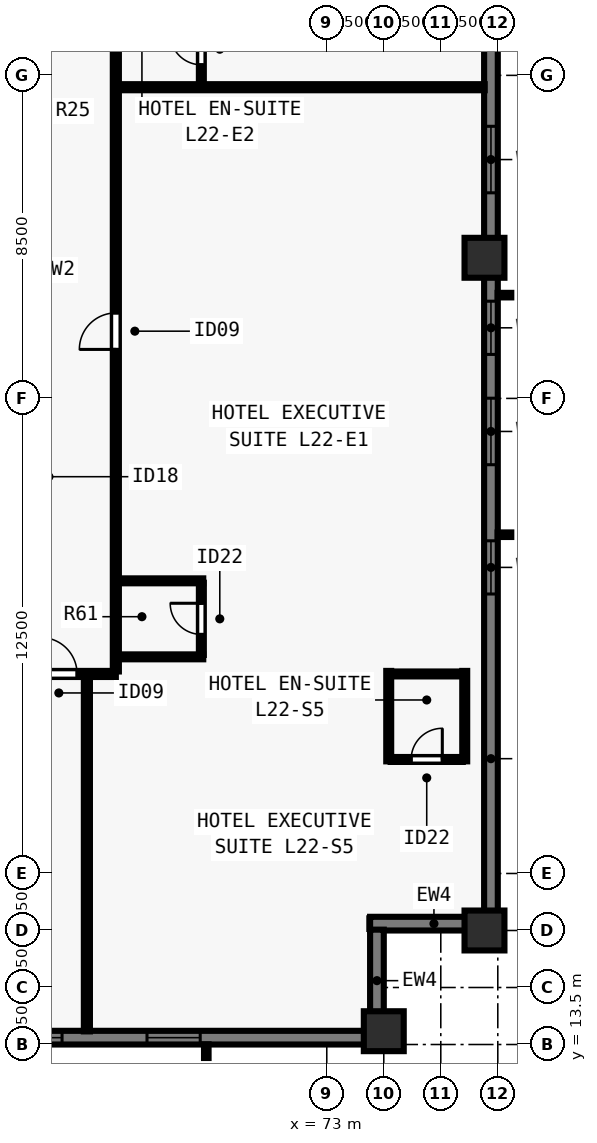
"""IFC4 building model, lengths in metres.
Left out: names, types, materials, properties, quantities, classifications, styles, units other than length and angle.
Written with IfcOpenShell. Run it as: python <this file> out.ifc"""

import sys

from ifc_helpers import new_model, si_unit, direction, frame, frame_2d, origin, origin_2d, place, context, subcontext, project, spatial, rectangle, extrude, element, fill, save


model = new_model("IFC4")
c1 = context("Model", 3, precision=1e-05, world=origin(), true_north=direction((0.0, 1.0)))
c2 = subcontext(c1, "Body", "Model", "MODEL_VIEW")
j1 = project(units=[si_unit("LENGTHUNIT", "METRE"), si_unit("PLANEANGLEUNIT", "RADIAN")], contexts=[c1])
p1 = place(None, origin())
s1 = spatial("IfcSite", under=j1, at=p1, CompositionType="ELEMENT")
p2 = place(p1, origin())
s2 = spatial("IfcBuilding", under=s1, at=p2, CompositionType="ELEMENT")
p3 = place(p2, frame((0.0, 0.0, 83.0)))
s3 = spatial("IfcBuildingStorey", under=s2, at=p3, CompositionType="ELEMENT", Elevation=83.0)
for number, where, z_axis, x_axis in (
    (1, (74.5, 13.85, 0.0), (0.0, 0.0, 1.0), (1.0, 0.0, 0.0)),
    (2, (77.15, 16.5, 0.0), (0.0, 0.0, 1.0), (0.0, 1.0, 0.0)),
    (3, (77.15, 34.2, 0.0), (0.0, 0.0, 1.0), (0.0, 1.0, 0.0)),
):
    element("IfcColumn", number, at=place(p3, frame(where, z_axis=z_axis, x_axis=x_axis)), inside=s3, PredefinedType="COLUMN", context=c2, shape_type="SweptSolid", body=[
        extrude(rectangle(XDim=1.05, YDim=1.05, at=origin_2d()), origin(), (0.0, 0.0, 1.0), 3.5),
    ])
p4 = place(p3, frame((77.32, 46.0, 0.0), z_axis=(0.0, 0.0, 1.0), x_axis=(0.0, -1.0, 0.0)))
e4 = element("IfcWall", 4, at=p4, inside=s3, PredefinedType="SOLIDWALL", context=c2, shape_type="SweptSolid", body=[
    extrude(rectangle(XDim=29.162, YDim=0.36, at=frame_2d((14.581, 0.0))), origin(), (0.0, 0.0, 1.0), 3.28),
])
p5 = place(p4, frame((4.938, 0.0, 0.8)))
e5 = element("IfcOpeningElement", 5, at=p5, cuts=e4, PredefinedType="OPENING", context=c2, shape_type="SweptSolid", body=[
    extrude(rectangle(XDim=1.4, YDim=1.544, at=frame_2d((0.7, 0.772))), frame((0.0, 0.19, 0.0), z_axis=(0.0, -1.0, 0.0), x_axis=(1.0, 0.0, 0.0)), (0.0, 0.0, 1.0), 0.38),
])
p6 = place(p4, frame((8.341, 0.0, 0.8)))
e6 = element("IfcOpeningElement", 6, at=p6, cuts=e4, PredefinedType="OPENING", context=c2, shape_type="SweptSolid", body=[
    extrude(rectangle(XDim=1.75, YDim=1.544, at=frame_2d((0.875, 0.772))), frame((0.0, 0.19, 0.0), z_axis=(0.0, -1.0, 0.0), x_axis=(1.0, 0.0, 0.0)), (0.0, 0.0, 1.0), 0.38),
])
p7 = place(p4, frame((12.942, 0.0, 0.8)))
e7 = element("IfcOpeningElement", 7, at=p7, cuts=e4, PredefinedType="OPENING", context=c2, shape_type="SweptSolid", body=[
    extrude(rectangle(XDim=1.4, YDim=1.544, at=frame_2d((0.7, 0.772))), frame((0.0, 0.19, 0.0), z_axis=(0.0, -1.0, 0.0), x_axis=(1.0, 0.0, 0.0)), (0.0, 0.0, 1.0), 0.38),
])
p8 = place(p4, frame((15.494, 0.0, 0.8)))
e8 = element("IfcOpeningElement", 8, at=p8, cuts=e4, PredefinedType="OPENING", context=c2, shape_type="SweptSolid", body=[
    extrude(rectangle(XDim=1.75, YDim=1.544, at=frame_2d((0.875, 0.772))), frame((0.0, 0.19, 0.0), z_axis=(0.0, -1.0, 0.0), x_axis=(1.0, 0.0, 0.0)), (0.0, 0.0, 1.0), 0.38),
])
p9 = place(p4, frame((19.247, 0.0, 0.8)))
e9 = element("IfcOpeningElement", 9, at=p9, cuts=e4, PredefinedType="OPENING", context=c2, shape_type="SweptSolid", body=[
    extrude(rectangle(XDim=1.4, YDim=1.544, at=frame_2d((0.7, 0.772))), frame((0.0, 0.19, 0.0), z_axis=(0.0, -1.0, 0.0), x_axis=(1.0, 0.0, 0.0)), (0.0, 0.0, 1.0), 0.38),
])
p10 = place(p3, frame((77.5, 16.68, 0.0), z_axis=(0.0, 0.0, 1.0), x_axis=(-1.0, 0.0, 0.0)))
e10 = element("IfcWall", 10, at=p10, inside=s3, PredefinedType="SOLIDWALL", context=c2, shape_type="SweptSolid", body=[
    extrude(rectangle(XDim=3.36, YDim=0.36, at=frame_2d((1.68, 0.0))), origin(), (0.0, 0.0, 1.0), 3.28),
])
p11 = place(p3, frame((74.32, 16.522, 0.0), z_axis=(0.0, 0.0, 1.0), x_axis=(0.0, -1.0, 0.0)))
e11 = element("IfcWall", 11, at=p11, inside=s3, PredefinedType="SOLIDWALL", context=c2, shape_type="SweptSolid", body=[
    extrude(rectangle(XDim=2.684, YDim=0.36, at=frame_2d((1.342, 0.0))), origin(), (0.0, 0.0, 1.0), 3.28),
])
p12 = place(p3, frame((74.5, 13.68, 0.0), z_axis=(0.0, 0.0, 1.0), x_axis=(-1.0, 0.0, 0.0)))
e12 = element("IfcWall", 12, at=p12, inside=s3, PredefinedType="SOLIDWALL", context=c2, shape_type="SweptSolid", body=[
    extrude(rectangle(XDim=44.662, YDim=0.36, at=frame_2d((22.331, 0.0))), origin(), (0.0, 0.0, 1.0), 3.28),
])
p13 = place(p12, frame((4.83, 0.0, 0.8)))
e13 = element("IfcOpeningElement", 13, at=p13, cuts=e12, PredefinedType="OPENING", context=c2, shape_type="SweptSolid", body=[
    extrude(rectangle(XDim=1.4, YDim=1.544, at=frame_2d((0.7, 0.772))), frame((0.0, 0.19, 0.0), z_axis=(0.0, -1.0, 0.0), x_axis=(1.0, 0.0, 0.0)), (0.0, 0.0, 1.0), 0.38),
])
p14 = place(p12, frame((8.465, 0.0, 0.8)))
e14 = element("IfcOpeningElement", 14, at=p14, cuts=e12, PredefinedType="OPENING", context=c2, shape_type="SweptSolid", body=[
    extrude(rectangle(XDim=1.75, YDim=1.544, at=frame_2d((0.875, 0.772))), frame((0.0, 0.19, 0.0), z_axis=(0.0, -1.0, 0.0), x_axis=(1.0, 0.0, 0.0)), (0.0, 0.0, 1.0), 0.38),
])
p15 = place(p12, frame((11.551, 0.0, 0.8)))
e15 = element("IfcOpeningElement", 15, at=p15, cuts=e12, PredefinedType="OPENING", context=c2, shape_type="SweptSolid", body=[
    extrude(rectangle(XDim=1.4, YDim=1.544, at=frame_2d((0.7, 0.772))), frame((0.0, 0.19, 0.0), z_axis=(0.0, -1.0, 0.0), x_axis=(1.0, 0.0, 0.0)), (0.0, 0.0, 1.0), 0.38),
])
p16 = place(p12, frame((14.736, 0.0, 0.8)))
e16 = element("IfcOpeningElement", 16, at=p16, cuts=e12, PredefinedType="OPENING", context=c2, shape_type="SweptSolid", body=[
    extrude(rectangle(XDim=1.75, YDim=1.544, at=frame_2d((0.875, 0.772))), frame((0.0, 0.19, 0.0), z_axis=(0.0, -1.0, 0.0), x_axis=(1.0, 0.0, 0.0)), (0.0, 0.0, 1.0), 0.38),
])
p17 = place(p12, frame((18.721, 0.0, 0.8)))
e17 = element("IfcOpeningElement", 17, at=p17, cuts=e12, PredefinedType="OPENING", context=c2, shape_type="SweptSolid", body=[
    extrude(rectangle(XDim=1.4, YDim=1.544, at=frame_2d((0.7, 0.772))), frame((0.0, 0.19, 0.0), z_axis=(0.0, -1.0, 0.0), x_axis=(1.0, 0.0, 0.0)), (0.0, 0.0, 1.0), 0.38),
])
p18 = place(p12, frame((21.456, 0.0, 0.8)))
e18 = element("IfcOpeningElement", 18, at=p18, cuts=e12, PredefinedType="OPENING", context=c2, shape_type="SweptSolid", body=[
    extrude(rectangle(XDim=1.75, YDim=1.544, at=frame_2d((0.875, 0.772))), frame((0.0, 0.19, 0.0), z_axis=(0.0, -1.0, 0.0), x_axis=(1.0, 0.0, 0.0)), (0.0, 0.0, 1.0), 0.38),
])
p19 = place(p12, frame((24.991, 0.0, 0.8)))
e19 = element("IfcOpeningElement", 19, at=p19, cuts=e12, PredefinedType="OPENING", context=c2, shape_type="SweptSolid", body=[
    extrude(rectangle(XDim=1.4, YDim=1.544, at=frame_2d((0.7, 0.772))), frame((0.0, 0.19, 0.0), z_axis=(0.0, -1.0, 0.0), x_axis=(1.0, 0.0, 0.0)), (0.0, 0.0, 1.0), 0.38),
])
p20 = place(p12, frame((28.177, 0.0, 0.8)))
e20 = element("IfcOpeningElement", 20, at=p20, cuts=e12, PredefinedType="OPENING", context=c2, shape_type="SweptSolid", body=[
    extrude(rectangle(XDim=1.75, YDim=1.544, at=frame_2d((0.875, 0.772))), frame((0.0, 0.19, 0.0), z_axis=(0.0, -1.0, 0.0), x_axis=(1.0, 0.0, 0.0)), (0.0, 0.0, 1.0), 0.38),
])
p21 = place(p12, frame((31.711, 0.0, 0.8)))
e21 = element("IfcOpeningElement", 21, at=p21, cuts=e12, PredefinedType="OPENING", context=c2, shape_type="SweptSolid", body=[
    extrude(rectangle(XDim=1.4, YDim=1.544, at=frame_2d((0.7, 0.772))), frame((0.0, 0.19, 0.0), z_axis=(0.0, -1.0, 0.0), x_axis=(1.0, 0.0, 0.0)), (0.0, 0.0, 1.0), 0.38),
])
p22 = place(p12, frame((34.897, 0.0, 0.8)))
e22 = element("IfcOpeningElement", 22, at=p22, cuts=e12, PredefinedType="OPENING", context=c2, shape_type="SweptSolid", body=[
    extrude(rectangle(XDim=1.75, YDim=1.544, at=frame_2d((0.875, 0.772))), frame((0.0, 0.19, 0.0), z_axis=(0.0, -1.0, 0.0), x_axis=(1.0, 0.0, 0.0)), (0.0, 0.0, 1.0), 0.38),
])
p23 = place(p12, frame((38.432, 0.0, 0.8)))
e23 = element("IfcOpeningElement", 23, at=p23, cuts=e12, PredefinedType="OPENING", context=c2, shape_type="SweptSolid", body=[
    extrude(rectangle(XDim=1.4, YDim=1.544, at=frame_2d((0.7, 0.772))), frame((0.0, 0.19, 0.0), z_axis=(0.0, -1.0, 0.0), x_axis=(1.0, 0.0, 0.0)), (0.0, 0.0, 1.0), 0.38),
])
p24 = place(p3, frame((36.55, 23.25, 0.0), z_axis=(0.0, 0.0, 1.0), x_axis=(1.0, 0.0, 0.0)))
e24 = element("IfcWall", 24, at=p24, inside=s3, PredefinedType="PARTITIONING", context=c2, shape_type="SweptSolid", body=[
    extrude(rectangle(XDim=30.9, YDim=0.16, at=frame_2d((15.45, 0.0))), origin(), (0.0, 0.0, 1.0), 3.28),
])
p25 = place(p24, frame((1.13, 0.0, 0.0)))
e25 = element("IfcOpeningElement", 25, at=p25, cuts=e24, PredefinedType="OPENING", context=c2, shape_type="SweptSolid", body=[
    extrude(rectangle(XDim=0.96, YDim=2.15, at=frame_2d((0.48, 1.075))), frame((0.0, 0.09, 0.0), z_axis=(0.0, -1.0, 0.0), x_axis=(1.0, 0.0, 0.0)), (0.0, 0.0, 1.0), 0.18),
])
p26 = place(p24, frame((6.093, 0.0, 0.0)))
e26 = element("IfcOpeningElement", 26, at=p26, cuts=e24, PredefinedType="OPENING", context=c2, shape_type="SweptSolid", body=[
    extrude(rectangle(XDim=0.96, YDim=2.15, at=frame_2d((0.48, 1.075))), frame((0.0, 0.09, 0.0), z_axis=(0.0, -1.0, 0.0), x_axis=(1.0, 0.0, 0.0)), (0.0, 0.0, 1.0), 0.18),
])
p27 = place(p24, frame((16.125, 0.0, 0.0)))
e27 = element("IfcOpeningElement", 27, at=p27, cuts=e24, PredefinedType="OPENING", context=c2, shape_type="SweptSolid", body=[
    extrude(rectangle(XDim=0.96, YDim=2.15, at=frame_2d((0.48, 1.075))), frame((0.0, 0.09, 0.0), z_axis=(0.0, -1.0, 0.0), x_axis=(1.0, 0.0, 0.0)), (0.0, 0.0, 1.0), 0.18),
])
p28 = place(p24, frame((26.157, 0.0, 0.0)))
e28 = element("IfcOpeningElement", 28, at=p28, cuts=e24, PredefinedType="OPENING", context=c2, shape_type="SweptSolid", body=[
    extrude(rectangle(XDim=0.96, YDim=2.15, at=frame_2d((0.48, 1.075))), frame((0.0, 0.09, 0.0), z_axis=(0.0, -1.0, 0.0), x_axis=(1.0, 0.0, 0.0)), (0.0, 0.0, 1.0), 0.18),
])
p29 = place(p24, frame((28.92, 0.0, 0.0)))
e29 = element("IfcOpeningElement", 29, at=p29, cuts=e24, PredefinedType="OPENING", context=c2, shape_type="SweptSolid", body=[
    extrude(rectangle(XDim=0.96, YDim=2.15, at=frame_2d((0.48, 1.075))), frame((0.0, 0.09, 0.0), z_axis=(0.0, -1.0, 0.0), x_axis=(1.0, 0.0, 0.0)), (0.0, 0.0, 1.0), 0.18),
])
p30 = place(p3, frame((67.45, 23.315, 0.0), z_axis=(0.0, 0.0, 1.0), x_axis=(0.0, 1.0, 0.0)))
e30 = element("IfcWall", 30, at=p30, inside=s3, PredefinedType="PARTITIONING", context=c2, shape_type="SweptSolid", body=[
    extrude(rectangle(XDim=31.37, YDim=0.16, at=frame_2d((15.685, 0.0))), origin(), (0.0, 0.0, 1.0), 3.28),
])
p31 = place(p30, frame((8.474, 0.0, 0.0)))
e31 = element("IfcOpeningElement", 31, at=p31, cuts=e30, PredefinedType="OPENING", context=c2, shape_type="SweptSolid", body=[
    extrude(rectangle(XDim=0.96, YDim=2.15, at=frame_2d((0.48, 1.075))), frame((0.0, 0.09, 0.0), z_axis=(0.0, -1.0, 0.0), x_axis=(1.0, 0.0, 0.0)), (0.0, 0.0, 1.0), 0.18),
])
p32 = place(p30, frame((23.974, 0.0, 0.0)))
e32 = element("IfcOpeningElement", 32, at=p32, cuts=e30, PredefinedType="OPENING", context=c2, shape_type="SweptSolid", body=[
    extrude(rectangle(XDim=0.96, YDim=2.15, at=frame_2d((0.48, 1.075))), frame((0.0, 0.09, 0.0), z_axis=(0.0, -1.0, 0.0), x_axis=(1.0, 0.0, 0.0)), (0.0, 0.0, 1.0), 0.18),
])
p33 = place(p3, frame((66.688, 13.845, 0.0), z_axis=(0.0, 0.0, 1.0), x_axis=(0.0, 1.0, 0.0)))
e33 = element("IfcWall", 33, at=p33, inside=s3, PredefinedType="PARTITIONING", context=c2, shape_type="SweptSolid", body=[
    extrude(rectangle(XDim=9.34, YDim=0.16, at=frame_2d((4.67, 0.0))), origin(), (0.0, 0.0, 1.0), 2.439),
])
for number, where, z_axis, x_axis in (
    (34, (76.63, 20.95, 0.0), (0.0, 0.0, 1.0), (0.0, 1.0, 0.0)),
    (35, (74.63, 20.95, 0.0), (0.0, 0.0, 1.0), (0.0, 1.0, 0.0)),
):
    element("IfcWall", number, at=place(p3, frame(where, z_axis=z_axis, x_axis=x_axis)), inside=s3, PredefinedType="PLUMBINGWALL", context=c2, shape_type="SweptSolid", body=[
        extrude(rectangle(XDim=2.38, YDim=0.13, at=frame_2d((1.19, 0.0))), origin(), (0.0, 0.0, 1.0), 3.28),
    ])
p34 = place(p3, frame((74.68, 21.0, 0.0), z_axis=(0.0, 0.0, 1.0), x_axis=(1.0, 0.0, 0.0)))
e36 = element("IfcWall", 36, at=p34, inside=s3, PredefinedType="PLUMBINGWALL", context=c2, shape_type="SweptSolid", body=[
    extrude(rectangle(XDim=1.9, YDim=0.13, at=frame_2d((0.95, 0.0))), origin(), (0.0, 0.0, 1.0), 3.28),
])
p35 = place(p34, frame((0.54, 0.0, 0.0)))
e37 = element("IfcOpeningElement", 37, at=p35, cuts=e36, PredefinedType="OPENING", context=c2, shape_type="SweptSolid", body=[
    extrude(rectangle(XDim=0.82, YDim=2.1, at=frame_2d((0.41, 1.05))), frame((0.0, 0.075, 0.0), z_axis=(0.0, -1.0, 0.0), x_axis=(1.0, 0.0, 0.0)), (0.0, 0.0, 1.0), 0.15),
])
p36 = place(p3, frame((74.68, 23.25, 0.0), z_axis=(0.0, 0.0, 1.0), x_axis=(1.0, 0.0, 0.0)))
e38 = element("IfcWall", 38, at=p36, inside=s3, PredefinedType="PLUMBINGWALL", context=c2, shape_type="SweptSolid", body=[
    extrude(rectangle(XDim=1.9, YDim=0.13, at=frame_2d((0.95, 0.0))), origin(), (0.0, 0.0, 1.0), 3.28),
])
p37 = place(p3, frame((67.515, 23.7, 0.0), z_axis=(0.0, 0.0, 1.0), x_axis=(1.0, 0.0, 0.0)))
e39 = element("IfcWall", 39, at=p37, inside=s3, PredefinedType="PLUMBINGWALL", context=c2, shape_type="SweptSolid", body=[
    extrude(rectangle(XDim=2.235, YDim=0.13, at=frame_2d((1.118, 0.0))), origin(), (0.0, 0.0, 1.0), 2.849),
])
p38 = place(p3, frame((67.515, 25.7, 0.0), z_axis=(0.0, 0.0, 1.0), x_axis=(1.0, 0.0, 0.0)))
e40 = element("IfcWall", 40, at=p38, inside=s3, PredefinedType="PLUMBINGWALL", context=c2, shape_type="SweptSolid", body=[
    extrude(rectangle(XDim=2.235, YDim=0.13, at=frame_2d((1.118, 0.0))), origin(), (0.0, 0.0, 1.0), 3.28),
])
p39 = place(p3, frame((69.7, 23.75, 0.0), z_axis=(0.0, 0.0, 1.0), x_axis=(0.0, 1.0, 0.0)))
e41 = element("IfcWall", 41, at=p39, inside=s3, PredefinedType="PLUMBINGWALL", context=c2, shape_type="SweptSolid", body=[
    extrude(rectangle(XDim=1.9, YDim=0.13, at=frame_2d((0.95, 0.0))), origin(), (0.0, 0.0, 1.0), 3.28),
])
p40 = place(p39, frame((0.54, 0.0, 0.0)))
e42 = element("IfcOpeningElement", 42, at=p40, cuts=e41, PredefinedType="OPENING", context=c2, shape_type="SweptSolid", body=[
    extrude(rectangle(XDim=0.82, YDim=2.1, at=frame_2d((0.41, 1.05))), frame((0.0, 0.075, 0.0), z_axis=(0.0, -1.0, 0.0), x_axis=(1.0, 0.0, 0.0)), (0.0, 0.0, 1.0), 0.15),
])
p41 = place(p3, frame((67.515, 38.688, 0.0), z_axis=(0.0, 0.0, 1.0), x_axis=(1.0, 0.0, 0.0)))
e43 = element("IfcWall", 43, at=p41, inside=s3, PredefinedType="PARTITIONING", context=c2, shape_type="SweptSolid", body=[
    extrude(rectangle(XDim=9.64, YDim=0.16, at=frame_2d((4.82, 0.0))), origin(), (0.0, 0.0, 1.0), 3.28),
])
p42 = place(p3, frame((69.7, 38.753, 0.0), z_axis=(0.0, 0.0, 1.0), x_axis=(0.0, 1.0, 0.0)))
e44 = element("IfcWall", 44, at=p42, inside=s3, PredefinedType="PLUMBINGWALL", context=c2, shape_type="SweptSolid", body=[
    extrude(rectangle(XDim=1.885, YDim=0.13, at=frame_2d((0.942, 0.0))), origin(), (0.0, 0.0, 1.0), 3.28),
])
p43 = place(p42, frame((0.525, 0.0, 0.0)))
e45 = element("IfcOpeningElement", 45, at=p43, cuts=e44, PredefinedType="OPENING", context=c2, shape_type="SweptSolid", body=[
    extrude(rectangle(XDim=0.82, YDim=2.1, at=frame_2d((0.41, 1.05))), frame((0.0, 0.075, 0.0), z_axis=(0.0, -1.0, 0.0), x_axis=(1.0, 0.0, 0.0)), (0.0, 0.0, 1.0), 0.15),
])
p44 = place(p6, origin())
e46 = element("IfcWindow", 46, at=p44, inside=s3, PartitioningType="SINGLE_PANEL", PredefinedType="WINDOW", context=c2, shape_type="SweptSolid", body=[
    extrude(rectangle(XDim=1.75, YDim=1.544, at=frame_2d((0.875, 0.772))), frame((0.0, -0.05, 0.0), z_axis=(0.0, -1.0, 0.0), x_axis=(1.0, 0.0, 0.0)), (0.0, 0.0, 1.0), 0.06),
])
fill(e6, e46)
p45 = place(p7, origin())
e47 = element("IfcWindow", 47, at=p45, inside=s3, PartitioningType="SINGLE_PANEL", PredefinedType="WINDOW", context=c2, shape_type="SweptSolid", body=[
    extrude(rectangle(XDim=1.4, YDim=1.544, at=frame_2d((0.7, 0.772))), frame((0.0, -0.05, 0.0), z_axis=(0.0, -1.0, 0.0), x_axis=(1.0, 0.0, 0.0)), (0.0, 0.0, 1.0), 0.06),
])
fill(e7, e47)
p46 = place(p8, origin())
e48 = element("IfcWindow", 48, at=p46, inside=s3, PartitioningType="SINGLE_PANEL", PredefinedType="WINDOW", context=c2, shape_type="SweptSolid", body=[
    extrude(rectangle(XDim=1.75, YDim=1.544, at=frame_2d((0.875, 0.772))), frame((0.0, -0.05, 0.0), z_axis=(0.0, -1.0, 0.0), x_axis=(1.0, 0.0, 0.0)), (0.0, 0.0, 1.0), 0.06),
])
fill(e8, e48)
p47 = place(p9, origin())
e49 = element("IfcWindow", 49, at=p47, inside=s3, PartitioningType="SINGLE_PANEL", PredefinedType="WINDOW", context=c2, shape_type="SweptSolid", body=[
    extrude(rectangle(XDim=1.4, YDim=1.544, at=frame_2d((0.7, 0.772))), frame((0.0, -0.05, 0.0), z_axis=(0.0, -1.0, 0.0), x_axis=(1.0, 0.0, 0.0)), (0.0, 0.0, 1.0), 0.06),
])
fill(e9, e49)
p48 = place(p13, origin())
e50 = element("IfcWindow", 50, at=p48, inside=s3, PartitioningType="SINGLE_PANEL", PredefinedType="WINDOW", context=c2, shape_type="SweptSolid", body=[
    extrude(rectangle(XDim=1.4, YDim=1.544, at=frame_2d((0.7, 0.772))), frame((0.0, -0.05, 0.0), z_axis=(0.0, -1.0, 0.0), x_axis=(1.0, 0.0, 0.0)), (0.0, 0.0, 1.0), 0.06),
])
fill(e13, e50)
p49 = place(p14, origin())
e51 = element("IfcWindow", 51, at=p49, inside=s3, PartitioningType="SINGLE_PANEL", PredefinedType="WINDOW", context=c2, shape_type="SweptSolid", body=[
    extrude(rectangle(XDim=1.75, YDim=1.544, at=frame_2d((0.875, 0.772))), frame((0.0, -0.05, 0.0), z_axis=(0.0, -1.0, 0.0), x_axis=(1.0, 0.0, 0.0)), (0.0, 0.0, 1.0), 0.06),
])
fill(e14, e51)
p50 = place(p35, origin())
e52 = element("IfcDoor", 52, at=p50, inside=s3, OperationType="SINGLE_SWING_RIGHT", PredefinedType="DOOR", context=c2, shape_type="SweptSolid", body=[
    extrude(rectangle(XDim=0.82, YDim=2.1, at=frame_2d((0.41, 1.05))), frame((0.0, 0.025, 0.0), z_axis=(0.0, -1.0, 0.0), x_axis=(1.0, 0.0, 0.0)), (0.0, 0.0, 1.0), 0.05),
])
fill(e37, e52)
p51 = place(p29, origin())
e53 = element("IfcDoor", 53, at=p51, inside=s3, OperationType="SINGLE_SWING_LEFT", PredefinedType="DOOR", context=c2, shape_type="SweptSolid", body=[
    extrude(rectangle(XDim=0.96, YDim=2.15, at=frame_2d((0.48, 1.075))), frame((0.0, 0.025, 0.0), z_axis=(0.0, -1.0, 0.0), x_axis=(1.0, 0.0, 0.0)), (0.0, 0.0, 1.0), 0.05),
])
fill(e29, e53)
p52 = place(p40, origin())
e54 = element("IfcDoor", 54, at=p52, inside=s3, OperationType="SINGLE_SWING_RIGHT", PredefinedType="DOOR", context=c2, shape_type="SweptSolid", body=[
    extrude(rectangle(XDim=0.82, YDim=2.1, at=frame_2d((0.41, 1.05))), frame((0.0, 0.025, 0.0), z_axis=(0.0, -1.0, 0.0), x_axis=(1.0, 0.0, 0.0)), (0.0, 0.0, 1.0), 0.05),
])
fill(e42, e54)
p53 = place(p31, origin())
e55 = element("IfcDoor", 55, at=p53, inside=s3, OperationType="SINGLE_SWING_LEFT", PredefinedType="DOOR", context=c2, shape_type="SweptSolid", body=[
    extrude(rectangle(XDim=0.96, YDim=2.15, at=frame_2d((0.48, 1.075))), frame((0.0, 0.025, 0.0), z_axis=(0.0, -1.0, 0.0), x_axis=(1.0, 0.0, 0.0)), (0.0, 0.0, 1.0), 0.05),
])
fill(e31, e55)
p54 = place(p43, origin())
e56 = element("IfcDoor", 56, at=p54, inside=s3, OperationType="SINGLE_SWING_RIGHT", PredefinedType="DOOR", context=c2, shape_type="SweptSolid", body=[
    extrude(rectangle(XDim=0.82, YDim=2.1, at=frame_2d((0.41, 1.05))), frame((0.0, 0.025, 0.0), z_axis=(0.0, -1.0, 0.0), x_axis=(1.0, 0.0, 0.0)), (0.0, 0.0, 1.0), 0.05),
])
fill(e45, e56)
save(model, sys.argv[1])
